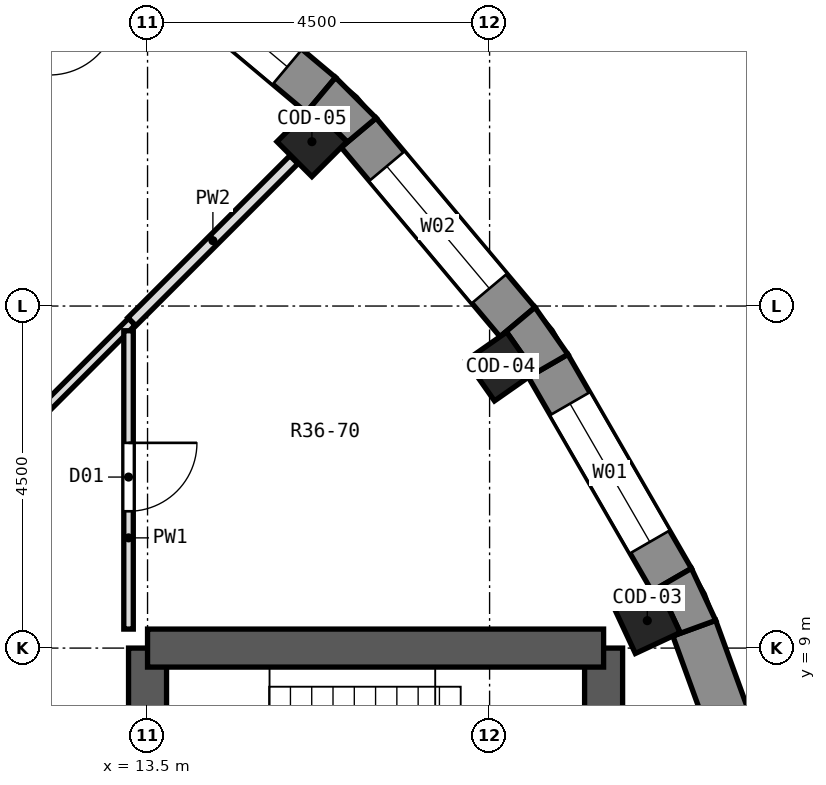
"""IFC4 building model, lengths in metres.
Left out: names, types, materials, properties, quantities, classifications, styles, units other than length and angle.
Written with IfcOpenShell. Run it as: python <this file> out.ifc"""

import sys

from ifc_helpers import new_model, si_unit, direction, frame, frame_2d, origin, origin_2d, place, context, subcontext, project, spatial, polyline, rectangle, outline, extrude, element, fill, save


model = new_model("IFC4")
c1 = context("Model", 3, precision=1e-05, world=origin(), true_north=direction((0.0, 1.0)))
c2 = subcontext(c1, "Body", "Model", "MODEL_VIEW")
j1 = project(units=[si_unit("LENGTHUNIT", "METRE"), si_unit("PLANEANGLEUNIT", "RADIAN")], contexts=[c1])
p1 = place(None, origin())
s1 = spatial("IfcSite", under=j1, at=p1, CompositionType="ELEMENT")
p2 = place(p1, origin())
s2 = spatial("IfcBuilding", under=s1, at=p2, CompositionType="ELEMENT")
p3 = place(p2, frame((0.0, 0.0, 259.4)))
s3 = spatial("IfcBuildingStorey", under=s2, at=p3, CompositionType="ELEMENT", Elevation=259.4)
for number, where, z_axis, x_axis in (
    (1, (20.075, 9.361, 0.0), (0.0, 0.0, 1.0), (0.906, 0.423, 0.0)),
    (2, (18.144, 12.705, 0.0), (0.0, 0.0, 1.0), (0.819, 0.574, 0.0)),
    (3, (15.662, 15.662, 0.0), (0.0, 0.0, 1.0), (0.707, 0.707, 0.0)),
):
    element("IfcColumn", number, at=place(p3, frame(where, z_axis=z_axis, x_axis=x_axis)), inside=s3, PredefinedType="COLUMN", context=c2, shape_type="SweptSolid", body=[
        extrude(rectangle(XDim=0.65, YDim=0.65, at=origin_2d()), origin(), (0.0, 0.0, 1.0), 3.3),
    ])
p4 = place(p3, frame((13.5, -9.0, 0.0), z_axis=(0.0, 0.0, 1.0), x_axis=(0.0, 1.0, 0.0)))
e4 = element("IfcWall", 4, at=p4, inside=s3, PredefinedType="SHEAR", context=c2, shape_type="SweptSolid", body=[
    extrude(rectangle(XDim=18.0, YDim=0.5, at=frame_2d((9.0, 0.0))), origin(), (0.0, 0.0, 1.0), 3.3),
])
p5 = place(p4, frame((15.4, 0.0, 0.0)))
e5 = element("IfcOpeningElement", 5, at=p5, cuts=e4, PredefinedType="OPENING", context=c2, shape_type="SweptSolid", body=[
    extrude(rectangle(XDim=1.2, YDim=2.1, at=frame_2d((0.6, 1.05))), frame((0.0, 0.262, 0.0), z_axis=(0.0, -1.0, 0.0), x_axis=(1.0, 0.0, 0.0)), (0.0, 0.0, 1.0), 0.524),
])
p6 = place(p4, frame((1.4, 0.0, 0.0)))
e6 = element("IfcOpeningElement", 6, at=p6, cuts=e4, PredefinedType="OPENING", context=c2, shape_type="SweptSolid", body=[
    extrude(rectangle(XDim=1.2, YDim=2.1, at=frame_2d((0.6, 1.05))), frame((0.0, 0.262, 0.0), z_axis=(0.0, -1.0, 0.0), x_axis=(1.0, 0.0, 0.0)), (0.0, 0.0, 1.0), 0.524),
])
p7 = place(p4, frame((7.5, 0.0, 0.0)))
e7 = element("IfcOpeningElement", 7, at=p7, cuts=e4, PredefinedType="OPENING", context=c2, shape_type="SweptSolid", body=[
    extrude(rectangle(XDim=3.0, YDim=2.4, at=frame_2d((1.5, 1.2))), frame((0.0, 0.262, 0.0), z_axis=(0.0, -1.0, 0.0), x_axis=(1.0, 0.0, 0.0)), (0.0, 0.0, 1.0), 0.524),
])
p8 = place(p3, frame((19.5, -9.0, 0.0), z_axis=(0.0, 0.0, 1.0), x_axis=(0.0, 1.0, 0.0)))
e8 = element("IfcWall", 8, at=p8, inside=s3, PredefinedType="SHEAR", context=c2, shape_type="SweptSolid", body=[
    extrude(rectangle(XDim=18.0, YDim=0.5, at=frame_2d((9.0, 0.0))), origin(), (0.0, 0.0, 1.0), 3.3),
])
p9 = place(p8, frame((9.45, 0.0, 0.0)))
e9 = element("IfcOpeningElement", 9, at=p9, cuts=e8, PredefinedType="OPENING", context=c2, shape_type="SweptSolid", body=[
    extrude(rectangle(XDim=0.9, YDim=2.1, at=frame_2d((0.45, 1.05))), frame((0.0, 0.262, 0.0), z_axis=(0.0, -1.0, 0.0), x_axis=(1.0, 0.0, 0.0)), (0.0, 0.0, 1.0), 0.524),
])
p10 = place(p8, frame((7.65, 0.0, 0.0)))
e10 = element("IfcOpeningElement", 10, at=p10, cuts=e8, PredefinedType="OPENING", context=c2, shape_type="SweptSolid", body=[
    extrude(rectangle(XDim=0.9, YDim=2.1, at=frame_2d((0.45, 1.05))), frame((0.0, 0.262, 0.0), z_axis=(0.0, -1.0, 0.0), x_axis=(1.0, 0.0, 0.0)), (0.0, 0.0, 1.0), 0.524),
])
p11 = place(p3, frame((13.5, 9.0, 0.0), z_axis=(0.0, 0.0, 1.0), x_axis=(1.0, 0.0, 0.0)))
e11 = element("IfcWall", 11, at=p11, inside=s3, PredefinedType="SHEAR", context=c2, shape_type="SweptSolid", body=[
    extrude(rectangle(XDim=6.0, YDim=0.5, at=frame_2d((3.0, 0.0))), origin(), (0.0, 0.0, 1.0), 3.3),
])
p12 = place(p3, frame((21.805, 6.206, 0.0), z_axis=(0.0, 0.0, 1.0), x_axis=(-0.342056509473, 0.939679383794, 0.0)))
e12 = element("IfcWall", 12, at=p12, inside=s3, PredefinedType="SOLIDWALL", context=c2, shape_type="SweptSolid", body=[
    extrude(rectangle(XDim=3.252, YDim=0.6, at=frame_2d((1.626, 0.0))), origin(), (0.0, 0.0, 1.0), 2.9),
])
p13 = place(p3, frame((20.396, 9.898, 0.0), z_axis=(0.0, 0.0, 1.0), x_axis=(-0.500014901547, 0.866016800201, 0.0)))
e13 = element("IfcWall", 13, at=p13, inside=s3, PredefinedType="SOLIDWALL", context=c2, shape_type="SweptSolid", body=[
    extrude(rectangle(XDim=3.252, YDim=0.6, at=frame_2d((1.626, 0.0))), origin(), (0.0, 0.0, 1.0), 2.9),
])
p14 = place(p13, frame((0.576, 0.0, 0.9)))
e14 = element("IfcOpeningElement", 14, at=p14, cuts=e13, PredefinedType="OPENING", context=c2, shape_type="SweptSolid", body=[
    extrude(rectangle(XDim=2.1, YDim=1.8, at=frame_2d((1.05, 0.9))), frame((0.0, 0.312, 0.0), z_axis=(0.0, -1.0, 0.0), x_axis=(1.0, 0.0, 0.0)), (0.0, 0.0, 1.0), 0.624),
])
p15 = place(p3, frame((18.367, 13.29, 0.0), z_axis=(0.0, 0.0, 1.0), x_axis=(-0.64277291405, 0.766056773982, 0.0)))
e15 = element("IfcWall", 15, at=p15, inside=s3, PredefinedType="SOLIDWALL", context=c2, shape_type="SweptSolid", body=[
    extrude(rectangle(XDim=3.252, YDim=0.6, at=frame_2d((1.626, 0.0))), origin(), (0.0, 0.0, 1.0), 2.9),
])
p16 = place(p15, frame((0.576, 0.0, 0.9)))
e16 = element("IfcOpeningElement", 16, at=p16, cuts=e15, PredefinedType="OPENING", context=c2, shape_type="SweptSolid", body=[
    extrude(rectangle(XDim=2.1, YDim=1.8, at=frame_2d((1.05, 0.9))), frame((0.0, 0.312, 0.0), z_axis=(0.0, -1.0, 0.0), x_axis=(1.0, 0.0, 0.0)), (0.0, 0.0, 1.0), 0.624),
])
p17 = place(p3, frame((15.781, 16.277, 0.0), z_axis=(0.0, 0.0, 1.0), x_axis=(-0.766056773982, 0.64277291405, 0.0)))
e17 = element("IfcWall", 17, at=p17, inside=s3, PredefinedType="SOLIDWALL", context=c2, shape_type="SweptSolid", body=[
    extrude(rectangle(XDim=3.252, YDim=0.6, at=frame_2d((1.626, 0.0))), origin(), (0.0, 0.0, 1.0), 2.9),
])
p18 = place(p17, frame((0.576, 0.0, 0.9)))
e18 = element("IfcOpeningElement", 18, at=p18, cuts=e17, PredefinedType="OPENING", context=c2, shape_type="SweptSolid", body=[
    extrude(rectangle(XDim=2.1, YDim=1.8, at=frame_2d((1.05, 0.9))), frame((0.0, 0.312, 0.0), z_axis=(0.0, -1.0, 0.0), x_axis=(1.0, 0.0, 0.0)), (0.0, 0.0, 1.0), 0.624),
])
p19 = place(p3, origin())
e19 = element("IfcWall", 19, at=p19, inside=s3, PredefinedType="SOLIDWALL", context=c2, shape_type="SweptSolid", body=[
    extrude(outline(polyline([(20.975, 9.364), (20.656, 10.048), (20.136, 9.748), (20.232, 9.793), (20.507, 9.204), (20.411, 9.159), (20.975, 9.364)])), origin(), (0.0, 0.0, 1.0), 2.9),
])
p20 = place(p3, origin())
e20 = element("IfcWall", 20, at=p20, inside=s3, PredefinedType="SOLIDWALL", context=c2, shape_type="SweptSolid", body=[
    extrude(outline(polyline([(19.03, 12.864), (18.597, 13.482), (18.137, 13.097), (18.224, 13.157), (18.597, 12.625), (18.51, 12.564), (19.03, 12.864)])), origin(), (0.0, 0.0, 1.0), 2.9),
])
p21 = place(p3, origin())
e21 = element("IfcWall", 21, at=p21, inside=s3, PredefinedType="SOLIDWALL", context=c2, shape_type="SweptSolid", body=[
    extrude(outline(polyline([(15.973, 16.507), (15.588, 16.047), (15.662, 16.122), (16.122, 15.662), (16.047, 15.588), (16.507, 15.973), (15.973, 16.507)])), origin(), (0.0, 0.0, 1.0), 2.9),
])
p22 = place(p3, frame((10.52, 10.52, 0.0), z_axis=(0.0, 0.0, 1.0), x_axis=(0.707106781187, 0.707106781187, 0.0)))
e22 = element("IfcWall", 22, at=p22, inside=s3, PredefinedType="PARTITIONING", context=c2, shape_type="SweptSolid", body=[
    extrude(rectangle(XDim=3.923, YDim=0.125, at=frame_2d((1.961, 0.0))), origin(), (0.0, 0.0, 1.0), 2.9),
])
p23 = place(p22, frame((1.449, 0.0, 0.0)))
e23 = element("IfcOpeningElement", 23, at=p23, cuts=e22, PredefinedType="OPENING", context=c2, shape_type="SweptSolid", body=[
    extrude(rectangle(XDim=0.9, YDim=2.1, at=frame_2d((0.45, 1.05))), frame((0.0, 0.074, 0.0), z_axis=(0.0, -1.0, 0.0), x_axis=(1.0, 0.0, 0.0)), (0.0, 0.0, 1.0), 0.149),
])
p24 = place(p3, frame((13.294, 13.294, 0.0), z_axis=(0.0, 0.0, 1.0), x_axis=(0.707106781187, 0.707106781187, 0.0)))
e24 = element("IfcWall", 24, at=p24, inside=s3, PredefinedType="PARTITIONING", context=c2, shape_type="SweptSolid", body=[
    extrude(rectangle(XDim=3.014, YDim=0.15, at=frame_2d((1.507, 0.0))), origin(), (0.0, 0.0, 1.0), 2.9),
])
p25 = place(p3, frame((10.407, 14.862, 0.0), z_axis=(0.0, 0.0, 1.0), x_axis=(0.573265962511, 0.81936935275, 0.0)))
e25 = element("IfcWall", 25, at=p25, inside=s3, PredefinedType="PARTITIONING", context=c2, shape_type="SweptSolid", body=[
    extrude(rectangle(XDim=3.671, YDim=0.125, at=frame_2d((1.836, 0.0))), origin(), (0.0, 0.0, 1.0), 2.9),
])
p26 = place(p25, frame((2.246, 0.0, 0.0)))
e26 = element("IfcOpeningElement", 26, at=p26, cuts=e25, PredefinedType="OPENING", context=c2, shape_type="SweptSolid", body=[
    extrude(rectangle(XDim=0.9, YDim=2.1, at=frame_2d((0.45, 1.05))), frame((0.0, 0.074, 0.0), z_axis=(0.0, -1.0, 0.0), x_axis=(1.0, 0.0, 0.0)), (0.0, 0.0, 1.0), 0.149),
])
p27 = place(p3, frame((13.25, 9.25, 0.0), z_axis=(0.0, 0.0, 1.0), x_axis=(0.0, 1.0, 0.0)))
e27 = element("IfcWall", 27, at=p27, inside=s3, PredefinedType="PARTITIONING", context=c2, shape_type="SweptSolid", body=[
    extrude(rectangle(XDim=3.925, YDim=0.125, at=frame_2d((1.962, 0.0))), origin(), (0.0, 0.0, 1.0), 2.9),
])
p28 = place(p27, frame((1.55, 0.0, 0.0)))
e28 = element("IfcOpeningElement", 28, at=p28, cuts=e27, PredefinedType="OPENING", context=c2, shape_type="SweptSolid", body=[
    extrude(rectangle(XDim=0.9, YDim=2.1, at=frame_2d((0.45, 1.05))), frame((0.0, 0.074, 0.0), z_axis=(0.0, -1.0, 0.0), x_axis=(1.0, 0.0, 0.0)), (0.0, 0.0, 1.0), 0.149),
])
p29 = place(p14, origin())
e29 = element("IfcWindow", 29, at=p29, inside=s3, PartitioningType="SINGLE_PANEL", PredefinedType="WINDOW", context=c2, shape_type="SweptSolid", body=[
    extrude(rectangle(XDim=2.1, YDim=1.8, at=frame_2d((1.05, 0.9))), frame((0.0, 0.18, 0.0), z_axis=(0.0, -1.0, 0.0), x_axis=(1.0, 0.0, 0.0)), (0.0, 0.0, 1.0), 0.06),
])
fill(e14, e29)
p30 = place(p16, origin())
e30 = element("IfcWindow", 30, at=p30, inside=s3, PartitioningType="SINGLE_PANEL", PredefinedType="WINDOW", context=c2, shape_type="SweptSolid", body=[
    extrude(rectangle(XDim=2.1, YDim=1.8, at=frame_2d((1.05, 0.9))), frame((0.0, 0.18, 0.0), z_axis=(0.0, -1.0, 0.0), x_axis=(1.0, 0.0, 0.0)), (0.0, 0.0, 1.0), 0.06),
])
fill(e16, e30)
p31 = place(p18, origin())
e31 = element("IfcWindow", 31, at=p31, inside=s3, PartitioningType="SINGLE_PANEL", PredefinedType="WINDOW", context=c2, shape_type="SweptSolid", body=[
    extrude(rectangle(XDim=2.1, YDim=1.8, at=frame_2d((1.05, 0.9))), frame((0.0, 0.18, 0.0), z_axis=(0.0, -1.0, 0.0), x_axis=(1.0, 0.0, 0.0)), (0.0, 0.0, 1.0), 0.06),
])
fill(e18, e31)
p32 = place(p28, frame((0.9, 0.0, 0.0), z_axis=(0.0, 0.0, 1.0), x_axis=(-1.0, 0.0, 0.0)))
e32 = element("IfcDoor", 32, at=p32, inside=s3, OperationType="SINGLE_SWING_LEFT", PredefinedType="DOOR", context=c2, shape_type="SweptSolid", body=[
    extrude(rectangle(XDim=0.9, YDim=2.1, at=frame_2d((0.45, 1.05))), frame((0.0, 0.025, 0.0), z_axis=(0.0, -1.0, 0.0), x_axis=(1.0, 0.0, 0.0)), (0.0, 0.0, 1.0), 0.05),
])
fill(e28, e32)
save(model, sys.argv[1])
